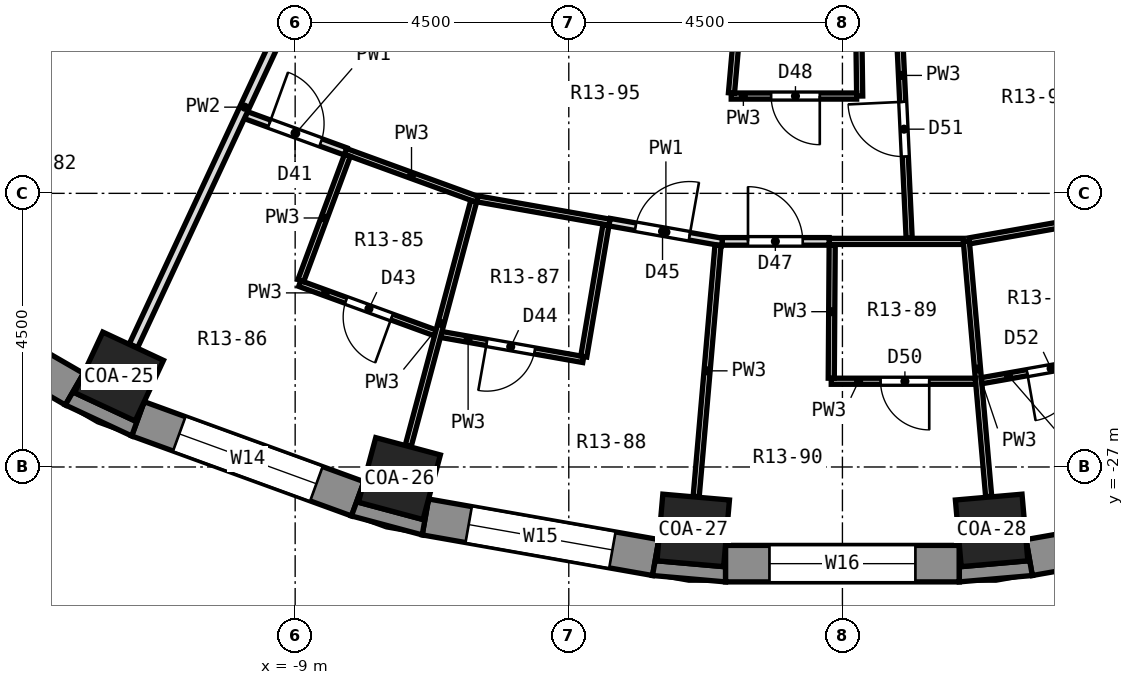
"""IFC4 building model, lengths in metres.
Left out: names, types, materials, properties, quantities, classifications, styles, units other than length and angle.
Written with IfcOpenShell. Run it as: python <this file> out.ifc"""

import sys

from ifc_helpers import new_model, si_unit, direction, frame, frame_2d, origin, origin_2d, place, context, subcontext, project, spatial, polyline, rectangle, outline, extrude, element, fill, save


model = new_model("IFC4")
c1 = context("Model", 3, precision=1e-05, world=origin(), true_north=direction((0.0, 1.0)))
c2 = subcontext(c1, "Body", "Model", "MODEL_VIEW")
j1 = project(units=[si_unit("LENGTHUNIT", "METRE"), si_unit("PLANEANGLEUNIT", "RADIAN")], contexts=[c1])
p1 = place(None, origin())
s1 = spatial("IfcSite", under=j1, at=p1, CompositionType="ELEMENT")
p2 = place(p1, origin())
s2 = spatial("IfcBuilding", under=s1, at=p2, CompositionType="ELEMENT")
p3 = place(p2, frame((0.0, 0.0, 65.9)))
s3 = spatial("IfcBuildingStorey", under=s2, at=p3, CompositionType="ELEMENT", Elevation=65.9)
for number, where, z_axis, x_axis in (
    (1, (-11.897, -25.512, 0.0), (0.0, 0.0, 1.0), (-0.423, -0.906, 0.0)),
    (2, (-7.286, -27.191, 0.0), (0.0, 0.0, 1.0), (-0.259, -0.966, 0.0)),
    (3, (-2.453, -28.043, 0.0), (0.0, 0.0, 1.0), (-0.087, -0.996, 0.0)),
    (4, (2.453, -28.043, 0.0), (0.0, 0.0, 1.0), (0.087, -0.996, 0.0)),
):
    element("IfcColumn", number, at=place(p3, frame(where, z_axis=z_axis, x_axis=x_axis)), inside=s3, PredefinedType="COLUMN", context=c2, shape_type="SweptSolid", body=[
        extrude(rectangle(XDim=1.1, YDim=1.1, at=origin_2d()), origin(), (0.0, 0.0, 1.0), 3.3),
    ])
p4 = place(p3, frame((-15.96, -23.798, 0.0), z_axis=(0.0, 0.0, 1.0), x_axis=(0.86603124159, -0.499989888488, 0.0)))
e5 = element("IfcWall", 5, at=p4, inside=s3, PredefinedType="SOLIDWALL", context=c2, shape_type="SweptSolid", body=[
    extrude(rectangle(XDim=3.846, YDim=0.6, at=frame_2d((1.923, 0.0))), origin(), (0.0, 0.0, 1.0), 2.75),
])
p5 = place(p4, frame((0.723, 0.0, 0.9)))
e6 = element("IfcOpeningElement", 6, at=p5, cuts=e5, PredefinedType="OPENING", context=c2, shape_type="SweptSolid", body=[
    extrude(rectangle(XDim=2.4, YDim=1.8, at=frame_2d((1.2, 0.9))), frame((0.0, 0.312, 0.0), z_axis=(0.0, -1.0, 0.0), x_axis=(1.0, 0.0, 0.0)), (0.0, 0.0, 1.0), 0.624),
])
p6 = place(p3, frame((-11.585, -26.208, 0.0), z_axis=(0.0, 0.0, 1.0), x_axis=(0.939689588564, -0.342028474173, 0.0)))
e7 = element("IfcWall", 7, at=p6, inside=s3, PredefinedType="SOLIDWALL", context=c2, shape_type="SweptSolid", body=[
    extrude(rectangle(XDim=3.846, YDim=0.6, at=frame_2d((1.923, 0.0))), origin(), (0.0, 0.0, 1.0), 2.75),
])
p7 = place(p6, frame((0.723, 0.0, 0.9)))
e8 = element("IfcOpeningElement", 8, at=p7, cuts=e7, PredefinedType="OPENING", context=c2, shape_type="SweptSolid", body=[
    extrude(rectangle(XDim=2.4, YDim=1.8, at=frame_2d((1.2, 0.9))), frame((0.0, 0.312, 0.0), z_axis=(0.0, -1.0, 0.0), x_axis=(1.0, 0.0, 0.0)), (0.0, 0.0, 1.0), 0.624),
])
p8 = place(p3, frame((-6.858, -27.821, 0.0), z_axis=(0.0, 0.0, 1.0), x_axis=(0.984800809218, -0.173687553279, 0.0)))
e9 = element("IfcWall", 9, at=p8, inside=s3, PredefinedType="SOLIDWALL", context=c2, shape_type="SweptSolid", body=[
    extrude(rectangle(XDim=3.846, YDim=0.6, at=frame_2d((1.923, 0.0))), origin(), (0.0, 0.0, 1.0), 2.75),
])
p9 = place(p8, frame((0.723, 0.0, 0.9)))
e10 = element("IfcOpeningElement", 10, at=p9, cuts=e9, PredefinedType="OPENING", context=c2, shape_type="SweptSolid", body=[
    extrude(rectangle(XDim=2.4, YDim=1.8, at=frame_2d((1.2, 0.9))), frame((0.0, 0.312, 0.0), z_axis=(0.0, -1.0, 0.0), x_axis=(1.0, 0.0, 0.0)), (0.0, 0.0, 1.0), 0.624),
])
p10 = place(p3, frame((-1.923, -28.59, 0.0), z_axis=(0.0, 0.0, 1.0), x_axis=(1.0, 0.0, 0.0)))
e11 = element("IfcWall", 11, at=p10, inside=s3, PredefinedType="SOLIDWALL", context=c2, shape_type="SweptSolid", body=[
    extrude(rectangle(XDim=3.846, YDim=0.6, at=frame_2d((1.923, 0.0))), origin(), (0.0, 0.0, 1.0), 2.75),
])
p11 = place(p10, frame((0.723, 0.0, 0.9)))
e12 = element("IfcOpeningElement", 12, at=p11, cuts=e11, PredefinedType="OPENING", context=c2, shape_type="SweptSolid", body=[
    extrude(rectangle(XDim=2.4, YDim=1.8, at=frame_2d((1.2, 0.9))), frame((0.0, 0.312, 0.0), z_axis=(0.0, -1.0, 0.0), x_axis=(1.0, 0.0, 0.0)), (0.0, 0.0, 1.0), 0.624),
])
p12 = place(p3, frame((3.071, -28.489, 0.0), z_axis=(0.0, 0.0, 1.0), x_axis=(0.984800809218, 0.173687553279, 0.0)))
e13 = element("IfcWall", 13, at=p12, inside=s3, PredefinedType="SOLIDWALL", context=c2, shape_type="SweptSolid", body=[
    extrude(rectangle(XDim=3.846, YDim=0.6, at=frame_2d((1.923, 0.0))), origin(), (0.0, 0.0, 1.0), 2.75),
])
p13 = place(p12, frame((0.723, 0.0, 0.9)))
e14 = element("IfcOpeningElement", 14, at=p13, cuts=e13, PredefinedType="OPENING", context=c2, shape_type="SweptSolid", body=[
    extrude(rectangle(XDim=2.4, YDim=1.8, at=frame_2d((1.2, 0.9))), frame((0.0, 0.312, 0.0), z_axis=(0.0, -1.0, 0.0), x_axis=(1.0, 0.0, 0.0)), (0.0, 0.0, 1.0), 0.624),
])
p14 = place(p3, origin())
e15 = element("IfcWall", 15, at=p14, inside=s3, PredefinedType="SOLIDWALL", context=c2, shape_type="SweptSolid", body=[
    extrude(outline(polyline([(-11.688, -26.49), (-11.483, -25.926), (-11.631, -26.243), (-12.628, -25.779), (-12.479, -25.461), (-12.78, -25.981), (-11.688, -26.49)])), origin(), (0.0, 0.0, 1.0), 2.75),
])
p15 = place(p3, origin())
e16 = element("IfcWall", 16, at=p15, inside=s3, PredefinedType="SOLIDWALL", context=c2, shape_type="SweptSolid", body=[
    extrude(outline(polyline([(-6.91, -28.117), (-6.806, -27.526), (-6.897, -27.865), (-7.959, -27.58), (-7.869, -27.241), (-8.074, -27.805), (-6.91, -28.117)])), origin(), (0.0, 0.0, 1.0), 2.75),
])
p16 = place(p3, origin())
e17 = element("IfcWall", 17, at=p16, inside=s3, PredefinedType="SOLIDWALL", context=c2, shape_type="SweptSolid", body=[
    extrude(outline(polyline([(-3.123, -28.785), (-1.923, -28.89), (-1.923, -28.29), (-1.954, -28.639), (-3.049, -28.543), (-3.019, -28.194), (-3.123, -28.785)])), origin(), (0.0, 0.0, 1.0), 2.75),
])
p17 = place(p3, origin())
e18 = element("IfcWall", 18, at=p17, inside=s3, PredefinedType="SOLIDWALL", context=c2, shape_type="SweptSolid", body=[
    extrude(outline(polyline([(1.923, -28.89), (3.123, -28.785), (3.019, -28.194), (3.049, -28.543), (1.954, -28.639), (1.923, -28.29), (1.923, -28.89)])), origin(), (0.0, 0.0, 1.0), 2.75),
])
p18 = place(p3, frame((0.256, -18.863, 0.0), z_axis=(0.0, 0.0, 1.0), x_axis=(0.013779398664, -0.999905059579, 0.0)))
e19 = element("IfcWall", 19, at=p18, inside=s3, PredefinedType="PARTITIONING", context=c2, shape_type="SweptSolid", body=[
    extrude(rectangle(XDim=2.038, YDim=0.1, at=frame_2d((1.019, 0.0))), origin(), (0.0, 0.0, 1.0), 2.75),
])
p19 = place(p3, frame((0.891, -18.863, 0.0), z_axis=(0.0, 0.0, 1.0), x_axis=(0.047186643512, -0.998886089939, 0.0)))
e20 = element("IfcWall", 20, at=p19, inside=s3, PredefinedType="PARTITIONING", context=c2, shape_type="SweptSolid", body=[
    extrude(rectangle(XDim=4.382, YDim=0.1, at=frame_2d((2.191, 0.0))), origin(), (0.0, 0.0, 1.0), 2.75),
])
p20 = place(p19, frame((2.135, 0.0, 0.0)))
e21 = element("IfcOpeningElement", 21, at=p20, cuts=e20, PredefinedType="OPENING", context=c2, shape_type="SweptSolid", body=[
    extrude(rectangle(XDim=0.9, YDim=2.1, at=frame_2d((0.45, 1.05))), frame((0.0, 0.062, 0.0), z_axis=(0.0, -1.0, 0.0), x_axis=(1.0, 0.0, 0.0)), (0.0, 0.0, 1.0), 0.124),
])
p21 = place(p3, frame((2.038, -23.29, 0.0), z_axis=(0.0, 0.0, 1.0), x_axis=(0.087200034709, -0.996190822055, 0.0)))
e22 = element("IfcWall", 22, at=p21, inside=s3, PredefinedType="PARTITIONING", context=c2, shape_type="SweptSolid", body=[
    extrude(rectangle(XDim=4.211, YDim=0.1, at=frame_2d((2.105, 0.0))), origin(), (0.0, 0.0, 1.0), 2.75),
])
p22 = place(p3, frame((-8.925, -23.983, 0.0), z_axis=(0.0, 0.0, 1.0), x_axis=(0.939643152994, -0.342156024399, 0.0)))
e23 = element("IfcWall", 23, at=p22, inside=s3, PredefinedType="PARTITIONING", context=c2, shape_type="SweptSolid", body=[
    extrude(rectangle(XDim=2.373, YDim=0.1, at=frame_2d((1.187, 0.0))), origin(), (0.0, 0.0, 1.0), 2.75),
])
p23 = place(p22, frame((0.812, 0.0, 0.0)))
e24 = element("IfcOpeningElement", 24, at=p23, cuts=e23, PredefinedType="OPENING", context=c2, shape_type="SweptSolid", body=[
    extrude(rectangle(XDim=0.8, YDim=2.1, at=frame_2d((0.4, 1.05))), frame((0.0, 0.062, 0.0), z_axis=(0.0, -1.0, 0.0), x_axis=(1.0, 0.0, 0.0)), (0.0, 0.0, 1.0), 0.124),
])
p24 = place(p3, frame((-8.17, -21.811, 0.0), z_axis=(0.0, 0.0, 1.0), x_axis=(0.939700645731, -0.341998094165, 0.0)))
e25 = element("IfcWall", 25, at=p24, inside=s3, PredefinedType="PARTITIONING", context=c2, shape_type="SweptSolid", body=[
    extrude(rectangle(XDim=2.306, YDim=0.1, at=frame_2d((1.153, 0.0))), origin(), (0.0, 0.0, 1.0), 2.75),
])
p25 = place(p3, frame((-9.809, -21.214, 0.0), z_axis=(0.0, 0.0, 1.0), x_axis=(0.939605351125, -0.342259819635, 0.0)))
e26 = element("IfcWall", 26, at=p25, inside=s3, PredefinedType="PARTITIONING", context=c2, shape_type="SweptSolid", body=[
    extrude(rectangle(XDim=1.745, YDim=0.125, at=frame_2d((0.873, 0.0))), origin(), (0.0, 0.0, 1.0), 2.75),
])
p26 = place(p25, frame((0.41, 0.0, 0.0)))
e27 = element("IfcOpeningElement", 27, at=p26, cuts=e26, PredefinedType="OPENING", context=c2, shape_type="SweptSolid", body=[
    extrude(rectangle(XDim=0.9, YDim=2.1, at=frame_2d((0.45, 1.05))), frame((0.0, 0.074, 0.0), z_axis=(0.0, -1.0, 0.0), x_axis=(1.0, 0.0, 0.0)), (0.0, 0.0, 1.0), 0.149),
])
p27 = place(p3, frame((-6.599, -24.821, 0.0), z_axis=(0.0, 0.0, 1.0), x_axis=(0.984804266692, -0.17366794841, 0.0)))
e28 = element("IfcWall", 28, at=p27, inside=s3, PredefinedType="PARTITIONING", context=c2, shape_type="SweptSolid", body=[
    extrude(rectangle(XDim=2.373, YDim=0.1, at=frame_2d((1.187, 0.0))), origin(), (0.0, 0.0, 1.0), 2.75),
])
p28 = place(p27, frame((0.761, 0.0, 0.0)))
e29 = element("IfcOpeningElement", 29, at=p28, cuts=e28, PredefinedType="OPENING", context=c2, shape_type="SweptSolid", body=[
    extrude(rectangle(XDim=0.8, YDim=2.1, at=frame_2d((0.4, 1.05))), frame((0.0, 0.062, 0.0), z_axis=(0.0, -1.0, 0.0), x_axis=(1.0, 0.0, 0.0)), (0.0, 0.0, 1.0), 0.124),
])
p29 = place(p3, frame((-6.002, -22.591, 0.0), z_axis=(0.0, 0.0, 1.0), x_axis=(0.984800270927, -0.173690605338, 0.0)))
e30 = element("IfcWall", 30, at=p29, inside=s3, PredefinedType="PARTITIONING", context=c2, shape_type="SweptSolid", body=[
    extrude(rectangle(XDim=2.205, YDim=0.1, at=frame_2d((1.103, 0.0))), origin(), (0.0, 0.0, 1.0), 2.75),
])
p30 = place(p3, frame((-3.83, -22.974, 0.0), z_axis=(0.0, 0.0, 1.0), x_axis=(0.984767891191, -0.173874093757, 0.0)))
e31 = element("IfcWall", 31, at=p30, inside=s3, PredefinedType="PARTITIONING", context=c2, shape_type="SweptSolid", body=[
    extrude(rectangle(XDim=1.883, YDim=0.125, at=frame_2d((0.941, 0.0))), origin(), (0.0, 0.0, 1.0), 2.75),
])
p31 = place(p30, frame((0.435, 0.0, 0.0)))
e32 = element("IfcOpeningElement", 32, at=p31, cuts=e31, PredefinedType="OPENING", context=c2, shape_type="SweptSolid", body=[
    extrude(rectangle(XDim=0.9, YDim=2.1, at=frame_2d((0.45, 1.05))), frame((0.0, 0.074, 0.0), z_axis=(0.0, -1.0, 0.0), x_axis=(1.0, 0.0, 0.0)), (0.0, 0.0, 1.0), 0.149),
])
p32 = place(p3, frame((-0.184, -25.59, 0.0), z_axis=(0.0, 0.0, 1.0), x_axis=(1.0, 0.0, 0.0)))
e33 = element("IfcWall", 33, at=p32, inside=s3, PredefinedType="PARTITIONING", context=c2, shape_type="SweptSolid", body=[
    extrude(rectangle(XDim=2.373, YDim=0.1, at=frame_2d((1.187, 0.0))), origin(), (0.0, 0.0, 1.0), 2.75),
])
p33 = place(p32, frame((0.812, 0.0, 0.0)))
e34 = element("IfcOpeningElement", 34, at=p33, cuts=e33, PredefinedType="OPENING", context=c2, shape_type="SweptSolid", body=[
    extrude(rectangle(XDim=0.8, YDim=2.1, at=frame_2d((0.4, 1.05))), frame((0.0, 0.062, 0.0), z_axis=(0.0, -1.0, 0.0), x_axis=(1.0, 0.0, 0.0)), (0.0, 0.0, 1.0), 0.124),
])
p34 = place(p3, frame((-0.218, -23.29, 0.0), z_axis=(0.0, 0.0, 1.0), x_axis=(1.0, 0.0, 0.0)))
e35 = element("IfcWall", 35, at=p34, inside=s3, PredefinedType="PARTITIONING", context=c2, shape_type="SweptSolid", body=[
    extrude(rectangle(XDim=2.206, YDim=0.1, at=frame_2d((1.103, 0.0))), origin(), (0.0, 0.0, 1.0), 2.75),
])
p35 = place(p3, frame((-1.976, -23.29, 0.0), z_axis=(0.0, 0.0, 1.0), x_axis=(1.0, 0.0, 0.0)))
e36 = element("IfcWall", 36, at=p35, inside=s3, PredefinedType="PARTITIONING", context=c2, shape_type="SweptSolid", body=[
    extrude(rectangle(XDim=1.758, YDim=0.125, at=frame_2d((0.879, 0.0))), origin(), (0.0, 0.0, 1.0), 2.75),
])
p36 = place(p35, frame((0.423, 0.0, 0.0)))
e37 = element("IfcOpeningElement", 37, at=p36, cuts=e36, PredefinedType="OPENING", context=c2, shape_type="SweptSolid", body=[
    extrude(rectangle(XDim=0.9, YDim=2.1, at=frame_2d((0.45, 1.05))), frame((0.0, 0.074, 0.0), z_axis=(0.0, -1.0, 0.0), x_axis=(1.0, 0.0, 0.0)), (0.0, 0.0, 1.0), 0.149),
])
p37 = place(p3, frame((-1.829, -20.9, 0.0), z_axis=(0.0, 0.0, 1.0), x_axis=(1.0, 0.0, 0.0)))
e38 = element("IfcWall", 38, at=p37, inside=s3, PredefinedType="PARTITIONING", context=c2, shape_type="SweptSolid", body=[
    extrude(rectangle(XDim=2.063, YDim=0.1, at=frame_2d((1.031, 0.0))), origin(), (0.0, 0.0, 1.0), 2.75),
])
p38 = place(p37, frame((0.656, 0.0, 0.0)))
e39 = element("IfcOpeningElement", 39, at=p38, cuts=e38, PredefinedType="OPENING", context=c2, shape_type="SweptSolid", body=[
    extrude(rectangle(XDim=0.8, YDim=2.1, at=frame_2d((0.4, 1.05))), frame((0.0, 0.062, 0.0), z_axis=(0.0, -1.0, 0.0), x_axis=(1.0, 0.0, 0.0)), (0.0, 0.0, 1.0), 0.124),
])
p39 = place(p3, frame((2.288, -25.581, 0.0), z_axis=(0.0, 0.0, 1.0), x_axis=(0.984789907179, 0.173749356022, 0.0)))
e40 = element("IfcWall", 40, at=p39, inside=s3, PredefinedType="PARTITIONING", context=c2, shape_type="SweptSolid", body=[
    extrude(rectangle(XDim=2.323, YDim=0.1, at=frame_2d((1.161, 0.0))), origin(), (0.0, 0.0, 1.0), 2.75),
])
p40 = place(p39, frame((0.761, 0.0, 0.0)))
e41 = element("IfcOpeningElement", 41, at=p40, cuts=e40, PredefinedType="OPENING", context=c2, shape_type="SweptSolid", body=[
    extrude(rectangle(XDim=0.8, YDim=2.1, at=frame_2d((0.4, 1.05))), frame((0.0, 0.062, 0.0), z_axis=(0.0, -1.0, 0.0), x_axis=(1.0, 0.0, 0.0)), (0.0, 0.0, 1.0), 0.124),
])
p41 = place(p3, frame((2.087, -23.281, 0.0), z_axis=(0.0, 0.0, 1.0), x_axis=(0.984804573467, 0.173666208797, 0.0)))
e42 = element("IfcWall", 42, at=p41, inside=s3, PredefinedType="PARTITIONING", context=c2, shape_type="SweptSolid", body=[
    extrude(rectangle(XDim=2.104, YDim=0.1, at=frame_2d((1.052, 0.0))), origin(), (0.0, 0.0, 1.0), 2.75),
])
p42 = place(p3, frame((-11.659, -25.006, 0.0), z_axis=(0.0, 0.0, 1.0), x_axis=(0.422344925588, 0.906435195604, 0.0)))
e43 = element("IfcWall", 43, at=p42, inside=s3, PredefinedType="PARTITIONING", context=c2, shape_type="SweptSolid", body=[
    extrude(rectangle(XDim=8.655, YDim=0.15, at=frame_2d((4.328, 0.0))), origin(), (0.0, 0.0, 1.0), 2.75),
])
p43 = place(p3, frame((-8.907, -23.936, 0.0), z_axis=(0.0, 0.0, 1.0), x_axis=(0.348774527409, 0.937206662925, 0.0)))
e44 = element("IfcWall", 44, at=p43, inside=s3, PredefinedType="PARTITIONING", context=c2, shape_type="SweptSolid", body=[
    extrude(rectangle(XDim=2.199, YDim=0.1, at=frame_2d((1.1, 0.0))), origin(), (0.0, 0.0, 1.0), 2.75),
])
p44 = place(p3, frame((-7.14, -26.65, 0.0), z_axis=(0.0, 0.0, 1.0), x_axis=(0.258611937806, 0.965981296726, 0.0)))
e45 = element("IfcWall", 45, at=p44, inside=s3, PredefinedType="PARTITIONING", context=c2, shape_type="SweptSolid", body=[
    extrude(rectangle(XDim=4.161, YDim=0.1, at=frame_2d((2.081, 0.0))), origin(), (0.0, 0.0, 1.0), 2.75),
])
p45 = place(p3, frame((-4.254, -25.184, 0.0), z_axis=(0.0, 0.0, 1.0), x_axis=(0.166534432253, 0.986035639759, 0.0)))
e46 = element("IfcWall", 46, at=p45, inside=s3, PredefinedType="PARTITIONING", context=c2, shape_type="SweptSolid", body=[
    extrude(rectangle(XDim=2.187, YDim=0.1, at=frame_2d((1.094, 0.0))), origin(), (0.0, 0.0, 1.0), 2.75),
])
p46 = place(p3, frame((-2.405, -27.485, 0.0), z_axis=(0.0, 0.0, 1.0), x_axis=(0.086512794622, 0.996250739707, 0.0)))
e47 = element("IfcWall", 47, at=p46, inside=s3, PredefinedType="PARTITIONING", context=c2, shape_type="SweptSolid", body=[
    extrude(rectangle(XDim=4.148, YDim=0.1, at=frame_2d((2.074, 0.0))), origin(), (0.0, 0.0, 1.0), 2.75),
])
p47 = place(p3, frame((-1.825, -20.85, 0.0), z_axis=(0.0, 0.0, 1.0), x_axis=(0.087115345234, 0.996198231591, 0.0)))
e48 = element("IfcWall", 48, at=p47, inside=s3, PredefinedType="PARTITIONING", context=c2, shape_type="SweptSolid", body=[
    extrude(rectangle(XDim=1.995, YDim=0.1, at=frame_2d((0.998, 0.0))), origin(), (0.0, 0.0, 1.0), 2.75),
])
p48 = place(p3, frame((-0.184, -25.54, 0.0), z_axis=(0.0, 0.0, 1.0), x_axis=(0.006919477202, 0.999976060131, 0.0)))
e49 = element("IfcWall", 49, at=p48, inside=s3, PredefinedType="PARTITIONING", context=c2, shape_type="SweptSolid", body=[
    extrude(rectangle(XDim=2.188, YDim=0.1, at=frame_2d((1.094, 0.0))), origin(), (0.0, 0.0, 1.0), 2.75),
])
p49 = place(p7, origin())
e50 = element("IfcWindow", 50, at=p49, inside=s3, PartitioningType="SINGLE_PANEL", PredefinedType="WINDOW", context=c2, shape_type="SweptSolid", body=[
    extrude(rectangle(XDim=2.4, YDim=1.8, at=frame_2d((1.2, 0.9))), frame((0.0, 0.18, 0.0), z_axis=(0.0, -1.0, 0.0), x_axis=(1.0, 0.0, 0.0)), (0.0, 0.0, 1.0), 0.06),
])
fill(e8, e50)
p50 = place(p9, origin())
e51 = element("IfcWindow", 51, at=p50, inside=s3, PartitioningType="SINGLE_PANEL", PredefinedType="WINDOW", context=c2, shape_type="SweptSolid", body=[
    extrude(rectangle(XDim=2.4, YDim=1.8, at=frame_2d((1.2, 0.9))), frame((0.0, 0.18, 0.0), z_axis=(0.0, -1.0, 0.0), x_axis=(1.0, 0.0, 0.0)), (0.0, 0.0, 1.0), 0.06),
])
fill(e10, e51)
p51 = place(p11, origin())
e52 = element("IfcWindow", 52, at=p51, inside=s3, PartitioningType="SINGLE_PANEL", PredefinedType="WINDOW", context=c2, shape_type="SweptSolid", body=[
    extrude(rectangle(XDim=2.4, YDim=1.8, at=frame_2d((1.2, 0.9))), frame((0.0, 0.18, 0.0), z_axis=(0.0, -1.0, 0.0), x_axis=(1.0, 0.0, 0.0)), (0.0, 0.0, 1.0), 0.06),
])
fill(e12, e52)
p52 = place(p26, origin())
e53 = element("IfcDoor", 53, at=p52, inside=s3, OperationType="SINGLE_SWING_LEFT", PredefinedType="DOOR", context=c2, shape_type="SweptSolid", body=[
    extrude(rectangle(XDim=0.9, YDim=2.1, at=frame_2d((0.45, 1.05))), frame((0.0, 0.025, 0.0), z_axis=(0.0, -1.0, 0.0), x_axis=(1.0, 0.0, 0.0)), (0.0, 0.0, 1.0), 0.05),
])
fill(e27, e53)
p53 = place(p23, frame((0.8, 0.0, 0.0), z_axis=(0.0, 0.0, 1.0), x_axis=(-1.0, 0.0, 0.0)))
e54 = element("IfcDoor", 54, at=p53, inside=s3, OperationType="SINGLE_SWING_LEFT", PredefinedType="DOOR", context=c2, shape_type="SweptSolid", body=[
    extrude(rectangle(XDim=0.8, YDim=2.1, at=frame_2d((0.4, 1.05))), frame((0.0, 0.025, 0.0), z_axis=(0.0, -1.0, 0.0), x_axis=(1.0, 0.0, 0.0)), (0.0, 0.0, 1.0), 0.05),
])
fill(e24, e54)
p54 = place(p28, frame((0.8, 0.0, 0.0), z_axis=(0.0, 0.0, 1.0), x_axis=(-1.0, 0.0, 0.0)))
e55 = element("IfcDoor", 55, at=p54, inside=s3, OperationType="SINGLE_SWING_RIGHT", PredefinedType="DOOR", context=c2, shape_type="SweptSolid", body=[
    extrude(rectangle(XDim=0.8, YDim=2.1, at=frame_2d((0.4, 1.05))), frame((0.0, 0.025, 0.0), z_axis=(0.0, -1.0, 0.0), x_axis=(1.0, 0.0, 0.0)), (0.0, 0.0, 1.0), 0.05),
])
fill(e29, e55)
p55 = place(p31, origin())
e56 = element("IfcDoor", 56, at=p55, inside=s3, OperationType="SINGLE_SWING_RIGHT", PredefinedType="DOOR", context=c2, shape_type="SweptSolid", body=[
    extrude(rectangle(XDim=0.9, YDim=2.1, at=frame_2d((0.45, 1.05))), frame((0.0, 0.025, 0.0), z_axis=(0.0, -1.0, 0.0), x_axis=(1.0, 0.0, 0.0)), (0.0, 0.0, 1.0), 0.05),
])
fill(e32, e56)
p56 = place(p36, origin())
e57 = element("IfcDoor", 57, at=p56, inside=s3, OperationType="SINGLE_SWING_LEFT", PredefinedType="DOOR", context=c2, shape_type="SweptSolid", body=[
    extrude(rectangle(XDim=0.9, YDim=2.1, at=frame_2d((0.45, 1.05))), frame((0.0, 0.025, 0.0), z_axis=(0.0, -1.0, 0.0), x_axis=(1.0, 0.0, 0.0)), (0.0, 0.0, 1.0), 0.05),
])
fill(e37, e57)
p57 = place(p38, frame((0.8, 0.0, 0.0), z_axis=(0.0, 0.0, 1.0), x_axis=(-1.0, 0.0, 0.0)))
e58 = element("IfcDoor", 58, at=p57, inside=s3, OperationType="SINGLE_SWING_LEFT", PredefinedType="DOOR", context=c2, shape_type="SweptSolid", body=[
    extrude(rectangle(XDim=0.8, YDim=2.1, at=frame_2d((0.4, 1.05))), frame((0.0, 0.025, 0.0), z_axis=(0.0, -1.0, 0.0), x_axis=(1.0, 0.0, 0.0)), (0.0, 0.0, 1.0), 0.05),
])
fill(e39, e58)
p58 = place(p33, frame((0.8, 0.0, 0.0), z_axis=(0.0, 0.0, 1.0), x_axis=(-1.0, 0.0, 0.0)))
e59 = element("IfcDoor", 59, at=p58, inside=s3, OperationType="SINGLE_SWING_LEFT", PredefinedType="DOOR", context=c2, shape_type="SweptSolid", body=[
    extrude(rectangle(XDim=0.8, YDim=2.1, at=frame_2d((0.4, 1.05))), frame((0.0, 0.025, 0.0), z_axis=(0.0, -1.0, 0.0), x_axis=(1.0, 0.0, 0.0)), (0.0, 0.0, 1.0), 0.05),
])
fill(e34, e59)
p59 = place(p20, frame((0.9, 0.0, 0.0), z_axis=(0.0, 0.0, 1.0), x_axis=(-1.0, 0.0, 0.0)))
e60 = element("IfcDoor", 60, at=p59, inside=s3, OperationType="SINGLE_SWING_RIGHT", PredefinedType="DOOR", context=c2, shape_type="SweptSolid", body=[
    extrude(rectangle(XDim=0.9, YDim=2.1, at=frame_2d((0.45, 1.05))), frame((0.0, 0.025, 0.0), z_axis=(0.0, -1.0, 0.0), x_axis=(1.0, 0.0, 0.0)), (0.0, 0.0, 1.0), 0.05),
])
fill(e21, e60)
p60 = place(p40, frame((0.8, 0.0, 0.0), z_axis=(0.0, 0.0, 1.0), x_axis=(-1.0, 0.0, 0.0)))
e61 = element("IfcDoor", 61, at=p60, inside=s3, OperationType="SINGLE_SWING_RIGHT", PredefinedType="DOOR", context=c2, shape_type="SweptSolid", body=[
    extrude(rectangle(XDim=0.8, YDim=2.1, at=frame_2d((0.4, 1.05))), frame((0.0, 0.025, 0.0), z_axis=(0.0, -1.0, 0.0), x_axis=(1.0, 0.0, 0.0)), (0.0, 0.0, 1.0), 0.05),
])
fill(e41, e61)
save(model, sys.argv[1])
